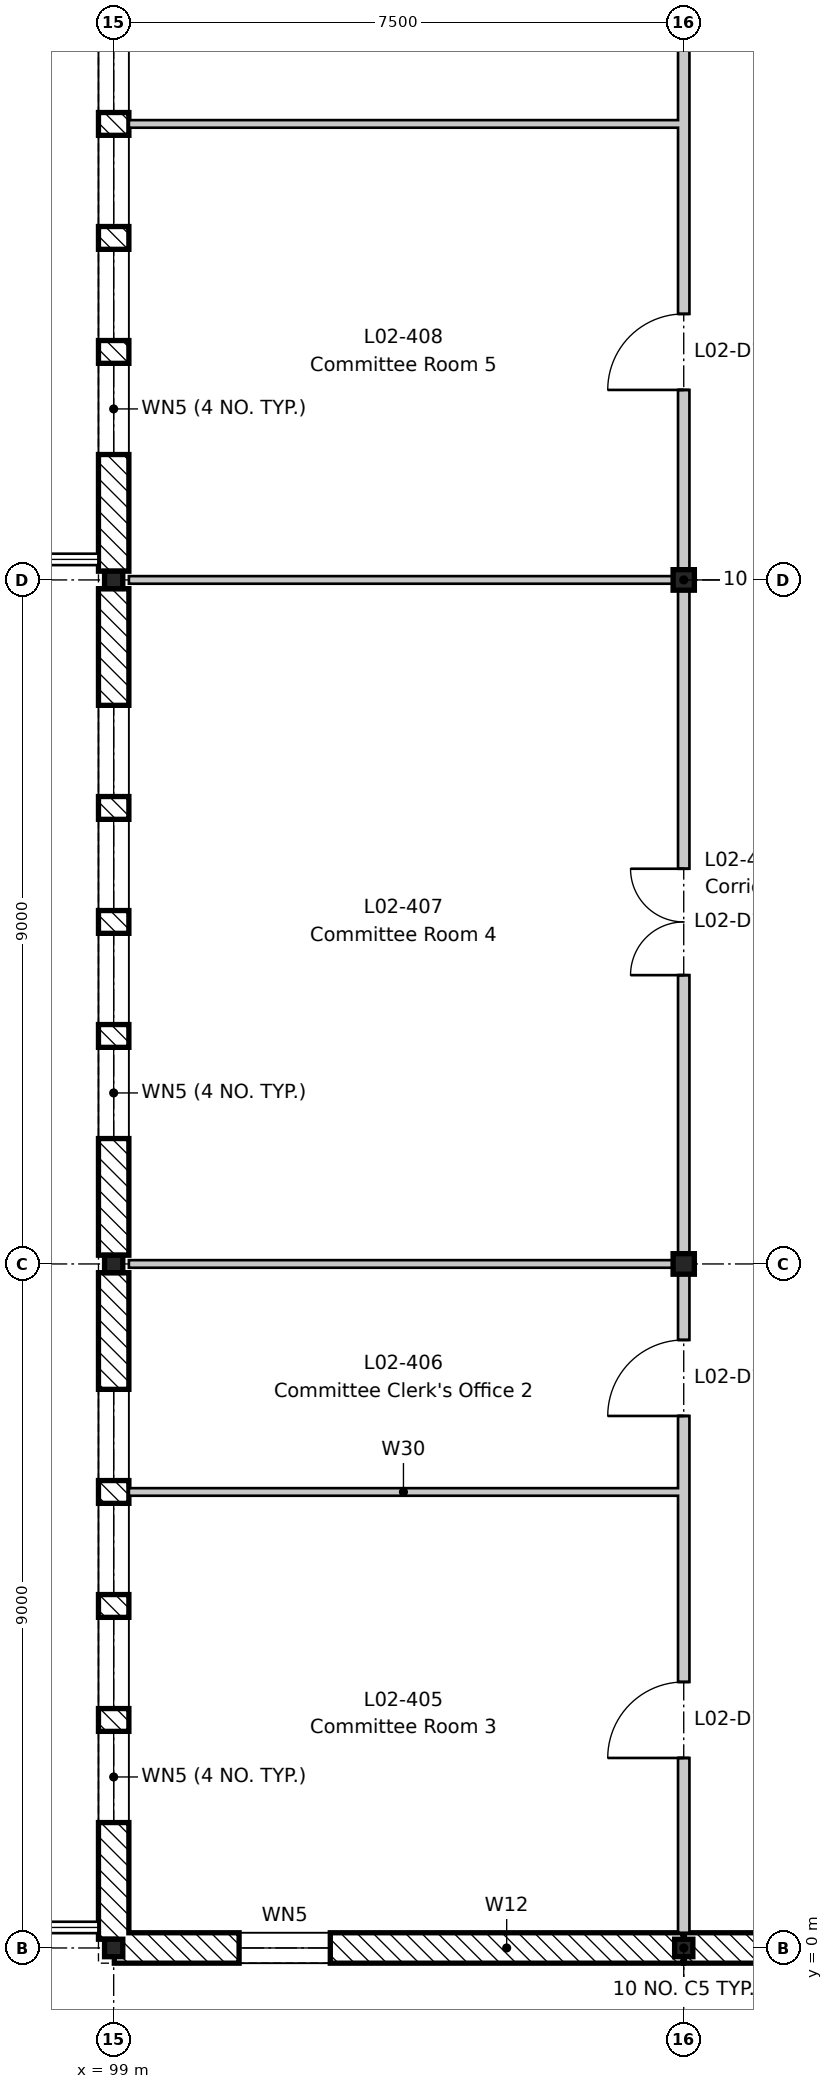
"""IFC4 building model, lengths in metres.
Left out: names, types, materials, properties, quantities, classifications, styles, units other than length and angle.
Written with IfcOpenShell. Run it as: python <this file> out.ifc"""

import sys

from ifc_helpers import new_model, si_unit, direction, frame, frame_2d, origin, origin_2d, place, context, subcontext, project, spatial, rectangle, i_section, extrude, element, fill, save


model = new_model("IFC4")
c1 = context("Model", 3, precision=1e-05, world=origin(), true_north=direction((0.0, 1.0)))
c2 = subcontext(c1, "Body", "Model", "MODEL_VIEW")
j1 = project(units=[si_unit("LENGTHUNIT", "METRE"), si_unit("PLANEANGLEUNIT", "RADIAN")], contexts=[c1])
p1 = place(None, origin())
s1 = spatial("IfcSite", under=j1, at=p1, CompositionType="ELEMENT")
p2 = place(p1, origin())
s2 = spatial("IfcBuilding", under=s1, at=p2, CompositionType="ELEMENT")
p3 = place(p2, frame((0.0, 0.0, 9.9)))
s3 = spatial("IfcBuildingStorey", under=s2, at=p3, CompositionType="ELEMENT", Elevation=9.9)
for number, where, z_axis, x_axis in (
    (1, (99.0, 0.0, -0.2), (0.0, 0.0, 1.0), (1.0, 0.0, 0.0)),
    (2, (99.0, 9.0, -0.2), (0.0, 0.0, 1.0), (1.0, 0.0, 0.0)),
    (3, (99.0, 18.0, -0.2), (0.0, 0.0, 1.0), (1.0, 0.0, 0.0)),
    (4, (106.5, 0.0, -0.2), (0.0, 0.0, 1.0), (1.0, 0.0, 0.0)),
):
    element("IfcColumn", number, at=place(p3, frame(where, z_axis=z_axis, x_axis=x_axis)), inside=s3, PredefinedType="COLUMN", context=c2, shape_type="SweptSolid", body=[
        extrude(i_section(OverallWidth=0.24, OverallDepth=0.23, WebThickness=0.008, FlangeThickness=0.012, FilletRadius=0.021, at=origin_2d()), origin(), (0.0, 0.0, 1.0), 4.5),
    ])
for number, where, z_axis, x_axis in (
    (5, (106.5, 9.0, -0.2), (0.0, 0.0, 1.0), (1.0, 0.0, 0.0)),
    (6, (106.5, 18.0, -0.2), (0.0, 0.0, 1.0), (1.0, 0.0, 0.0)),
):
    element("IfcColumn", number, at=place(p3, frame(where, z_axis=z_axis, x_axis=x_axis)), inside=s3, PredefinedType="COLUMN", context=c2, shape_type="SweptSolid", body=[
        extrude(i_section(OverallWidth=0.28, OverallDepth=0.27, WebThickness=0.008, FlangeThickness=0.013, FilletRadius=0.024, at=origin_2d()), origin(), (0.0, 0.0, 1.0), 4.5),
    ])
p4 = place(p3, frame((99.0, 0.115, 0.0), z_axis=(0.0, 0.0, 1.0), x_axis=(0.0, 1.0, 0.0)))
e7 = element("IfcWall", 7, at=p4, inside=s3, PredefinedType="STANDARD", context=c2, shape_type="SweptSolid", body=[
    extrude(rectangle(XDim=8.77, YDim=0.4, at=frame_2d((4.385, 0.0))), origin(), (0.0, 0.0, 1.0), 3.9),
])
p5 = place(p4, frame((1.535, 0.0, 0.6)))
e8 = element("IfcOpeningElement", 8, at=p5, cuts=e7, PredefinedType="OPENING", context=c2, shape_type="SweptSolid", body=[
    extrude(rectangle(XDim=1.2, YDim=3.0, at=frame_2d((0.6, 1.5))), frame((0.0, 0.21, 0.0), z_axis=(0.0, -1.0, 0.0), x_axis=(1.0, 0.0, 0.0)), (0.0, 0.0, 1.0), 0.42),
])
p6 = place(p4, frame((3.035, 0.0, 0.6)))
e9 = element("IfcOpeningElement", 9, at=p6, cuts=e7, PredefinedType="OPENING", context=c2, shape_type="SweptSolid", body=[
    extrude(rectangle(XDim=1.2, YDim=3.0, at=frame_2d((0.6, 1.5))), frame((0.0, 0.21, 0.0), z_axis=(0.0, -1.0, 0.0), x_axis=(1.0, 0.0, 0.0)), (0.0, 0.0, 1.0), 0.42),
])
p7 = place(p4, frame((4.535, 0.0, 0.6)))
e10 = element("IfcOpeningElement", 10, at=p7, cuts=e7, PredefinedType="OPENING", context=c2, shape_type="SweptSolid", body=[
    extrude(rectangle(XDim=1.2, YDim=3.0, at=frame_2d((0.6, 1.5))), frame((0.0, 0.21, 0.0), z_axis=(0.0, -1.0, 0.0), x_axis=(1.0, 0.0, 0.0)), (0.0, 0.0, 1.0), 0.42),
])
p8 = place(p4, frame((6.035, 0.0, 0.6)))
e11 = element("IfcOpeningElement", 11, at=p8, cuts=e7, PredefinedType="OPENING", context=c2, shape_type="SweptSolid", body=[
    extrude(rectangle(XDim=1.2, YDim=3.0, at=frame_2d((0.6, 1.5))), frame((0.0, 0.21, 0.0), z_axis=(0.0, -1.0, 0.0), x_axis=(1.0, 0.0, 0.0)), (0.0, 0.0, 1.0), 0.42),
])
p9 = place(p3, frame((99.0, 9.115, 0.0), z_axis=(0.0, 0.0, 1.0), x_axis=(0.0, 1.0, 0.0)))
e12 = element("IfcWall", 12, at=p9, inside=s3, PredefinedType="STANDARD", context=c2, shape_type="SweptSolid", body=[
    extrude(rectangle(XDim=8.77, YDim=0.4, at=frame_2d((4.385, 0.0))), origin(), (0.0, 0.0, 1.0), 3.9),
])
p10 = place(p9, frame((1.535, 0.0, 0.6)))
e13 = element("IfcOpeningElement", 13, at=p10, cuts=e12, PredefinedType="OPENING", context=c2, shape_type="SweptSolid", body=[
    extrude(rectangle(XDim=1.2, YDim=3.0, at=frame_2d((0.6, 1.5))), frame((0.0, 0.21, 0.0), z_axis=(0.0, -1.0, 0.0), x_axis=(1.0, 0.0, 0.0)), (0.0, 0.0, 1.0), 0.42),
])
p11 = place(p9, frame((3.035, 0.0, 0.6)))
e14 = element("IfcOpeningElement", 14, at=p11, cuts=e12, PredefinedType="OPENING", context=c2, shape_type="SweptSolid", body=[
    extrude(rectangle(XDim=1.2, YDim=3.0, at=frame_2d((0.6, 1.5))), frame((0.0, 0.21, 0.0), z_axis=(0.0, -1.0, 0.0), x_axis=(1.0, 0.0, 0.0)), (0.0, 0.0, 1.0), 0.42),
])
p12 = place(p9, frame((4.535, 0.0, 0.6)))
e15 = element("IfcOpeningElement", 15, at=p12, cuts=e12, PredefinedType="OPENING", context=c2, shape_type="SweptSolid", body=[
    extrude(rectangle(XDim=1.2, YDim=3.0, at=frame_2d((0.6, 1.5))), frame((0.0, 0.21, 0.0), z_axis=(0.0, -1.0, 0.0), x_axis=(1.0, 0.0, 0.0)), (0.0, 0.0, 1.0), 0.42),
])
p13 = place(p9, frame((6.035, 0.0, 0.6)))
e16 = element("IfcOpeningElement", 16, at=p13, cuts=e12, PredefinedType="OPENING", context=c2, shape_type="SweptSolid", body=[
    extrude(rectangle(XDim=1.2, YDim=3.0, at=frame_2d((0.6, 1.5))), frame((0.0, 0.21, 0.0), z_axis=(0.0, -1.0, 0.0), x_axis=(1.0, 0.0, 0.0)), (0.0, 0.0, 1.0), 0.42),
])
p14 = place(p3, frame((99.0, 18.115, 0.0), z_axis=(0.0, 0.0, 1.0), x_axis=(0.0, 1.0, 0.0)))
e17 = element("IfcWall", 17, at=p14, inside=s3, PredefinedType="STANDARD", context=c2, shape_type="SweptSolid", body=[
    extrude(rectangle(XDim=8.77, YDim=0.4, at=frame_2d((4.385, 0.0))), origin(), (0.0, 0.0, 1.0), 3.9),
])
p15 = place(p14, frame((1.535, 0.0, 0.6)))
e18 = element("IfcOpeningElement", 18, at=p15, cuts=e17, PredefinedType="OPENING", context=c2, shape_type="SweptSolid", body=[
    extrude(rectangle(XDim=1.2, YDim=3.0, at=frame_2d((0.6, 1.5))), frame((0.0, 0.21, 0.0), z_axis=(0.0, -1.0, 0.0), x_axis=(1.0, 0.0, 0.0)), (0.0, 0.0, 1.0), 0.42),
])
p16 = place(p14, frame((3.035, 0.0, 0.6)))
e19 = element("IfcOpeningElement", 19, at=p16, cuts=e17, PredefinedType="OPENING", context=c2, shape_type="SweptSolid", body=[
    extrude(rectangle(XDim=1.2, YDim=3.0, at=frame_2d((0.6, 1.5))), frame((0.0, 0.21, 0.0), z_axis=(0.0, -1.0, 0.0), x_axis=(1.0, 0.0, 0.0)), (0.0, 0.0, 1.0), 0.42),
])
p17 = place(p14, frame((4.535, 0.0, 0.6)))
e20 = element("IfcOpeningElement", 20, at=p17, cuts=e17, PredefinedType="OPENING", context=c2, shape_type="SweptSolid", body=[
    extrude(rectangle(XDim=1.2, YDim=3.0, at=frame_2d((0.6, 1.5))), frame((0.0, 0.21, 0.0), z_axis=(0.0, -1.0, 0.0), x_axis=(1.0, 0.0, 0.0)), (0.0, 0.0, 1.0), 0.42),
])
p18 = place(p14, frame((6.035, 0.0, 0.6)))
e21 = element("IfcOpeningElement", 21, at=p18, cuts=e17, PredefinedType="OPENING", context=c2, shape_type="SweptSolid", body=[
    extrude(rectangle(XDim=1.2, YDim=3.0, at=frame_2d((0.6, 1.5))), frame((0.0, 0.21, 0.0), z_axis=(0.0, -1.0, 0.0), x_axis=(1.0, 0.0, 0.0)), (0.0, 0.0, 1.0), 0.42),
])
p19 = place(p3, frame((106.491, 0.0, 0.0), z_axis=(0.0, 0.0, 1.0), x_axis=(-1.0, 0.0, 0.0)))
e22 = element("IfcWall", 22, at=p19, inside=s3, PredefinedType="STANDARD", context=c2, shape_type="SweptSolid", body=[
    extrude(rectangle(XDim=7.482, YDim=0.4, at=frame_2d((3.741, 0.0))), origin(), (0.0, 0.0, 1.0), 3.97),
])
p20 = place(p19, frame((4.641, 0.0, 0.6)))
e23 = element("IfcOpeningElement", 23, at=p20, cuts=e22, PredefinedType="OPENING", context=c2, shape_type="SweptSolid", body=[
    extrude(rectangle(XDim=1.2, YDim=3.0, at=frame_2d((0.6, 1.5))), frame((0.0, 0.21, 0.0), z_axis=(0.0, -1.0, 0.0), x_axis=(1.0, 0.0, 0.0)), (0.0, 0.0, 1.0), 0.42),
])
p21 = place(p3, frame((109.491, 0.0, 0.0), z_axis=(0.0, 0.0, 1.0), x_axis=(-1.0, 0.0, 0.0)))
e24 = element("IfcWall", 24, at=p21, inside=s3, PredefinedType="STANDARD", context=c2, shape_type="SweptSolid", body=[
    extrude(rectangle(XDim=2.982, YDim=0.4, at=frame_2d((1.491, 0.0))), origin(), (0.0, 0.0, 1.0), 4.1),
])
p22 = place(p3, frame((99.2, 6.0, 0.0), z_axis=(0.0, 0.0, 1.0), x_axis=(1.0, 0.0, 0.0)))
e25 = element("IfcWall", 25, at=p22, inside=s3, PredefinedType="PARTITIONING", context=c2, shape_type="SweptSolid", body=[
    extrude(rectangle(XDim=7.225, YDim=0.1, at=frame_2d((3.613, 0.0))), origin(), (0.0, 0.0, 1.0), 4.3),
])
for number, where, z_axis, x_axis in (
    (26, (99.2, 9.0, 0.0), (0.0, 0.0, 1.0), (1.0, 0.0, 0.0)),
    (27, (99.2, 18.0, 0.0), (0.0, 0.0, 1.0), (1.0, 0.0, 0.0)),
):
    element("IfcWall", number, at=place(p3, frame(where, z_axis=z_axis, x_axis=x_axis)), inside=s3, PredefinedType="PARTITIONING", context=c2, shape_type="SweptSolid", body=[
        extrude(rectangle(XDim=7.225, YDim=0.1, at=frame_2d((3.613, 0.0))), origin(), (0.0, 0.0, 1.0), 3.95),
    ])
p23 = place(p3, frame((99.2, 24.0, 0.0), z_axis=(0.0, 0.0, 1.0), x_axis=(1.0, 0.0, 0.0)))
e28 = element("IfcWall", 28, at=p23, inside=s3, PredefinedType="PARTITIONING", context=c2, shape_type="SweptSolid", body=[
    extrude(rectangle(XDim=7.225, YDim=0.1, at=frame_2d((3.613, 0.0))), origin(), (0.0, 0.0, 1.0), 4.3),
])
p24 = place(p3, frame((106.5, 0.2, 0.0), z_axis=(0.0, 0.0, 1.0), x_axis=(0.0, 1.0, 0.0)))
e29 = element("IfcWall", 29, at=p24, inside=s3, PredefinedType="PARTITIONING", context=c2, shape_type="SweptSolid", body=[
    extrude(rectangle(XDim=53.6, YDim=0.15, at=frame_2d((26.8, 0.0))), origin(), (0.0, 0.0, 1.0), 3.78),
])
p25 = place(p24, frame((2.3, 0.0, 0.0)))
e30 = element("IfcOpeningElement", 30, at=p25, cuts=e29, PredefinedType="OPENING", context=c2, shape_type="SweptSolid", body=[
    extrude(rectangle(XDim=1.0, YDim=2.1, at=frame_2d((0.5, 1.05))), frame((0.0, 0.085, 0.0), z_axis=(0.0, -1.0, 0.0), x_axis=(1.0, 0.0, 0.0)), (0.0, 0.0, 1.0), 0.17),
])
p26 = place(p24, frame((6.8, 0.0, 0.0)))
e31 = element("IfcOpeningElement", 31, at=p26, cuts=e29, PredefinedType="OPENING", context=c2, shape_type="SweptSolid", body=[
    extrude(rectangle(XDim=1.0, YDim=2.1, at=frame_2d((0.5, 1.05))), frame((0.0, 0.085, 0.0), z_axis=(0.0, -1.0, 0.0), x_axis=(1.0, 0.0, 0.0)), (0.0, 0.0, 1.0), 0.17),
])
p27 = place(p24, frame((12.6, 0.0, 0.0)))
e32 = element("IfcOpeningElement", 32, at=p27, cuts=e29, PredefinedType="OPENING", context=c2, shape_type="SweptSolid", body=[
    extrude(rectangle(XDim=1.4, YDim=2.1, at=frame_2d((0.7, 1.05))), frame((0.0, 0.085, 0.0), z_axis=(0.0, -1.0, 0.0), x_axis=(1.0, 0.0, 0.0)), (0.0, 0.0, 1.0), 0.17),
])
p28 = place(p24, frame((20.3, 0.0, 0.0)))
e33 = element("IfcOpeningElement", 33, at=p28, cuts=e29, PredefinedType="OPENING", context=c2, shape_type="SweptSolid", body=[
    extrude(rectangle(XDim=1.0, YDim=2.1, at=frame_2d((0.5, 1.05))), frame((0.0, 0.085, 0.0), z_axis=(0.0, -1.0, 0.0), x_axis=(1.0, 0.0, 0.0)), (0.0, 0.0, 1.0), 0.17),
])
p29 = place(p24, frame((27.6, 0.0, 0.0)))
e34 = element("IfcOpeningElement", 34, at=p29, cuts=e29, PredefinedType="OPENING", context=c2, shape_type="SweptSolid", body=[
    extrude(rectangle(XDim=1.4, YDim=2.1, at=frame_2d((0.7, 1.05))), frame((0.0, 0.085, 0.0), z_axis=(0.0, -1.0, 0.0), x_axis=(1.0, 0.0, 0.0)), (0.0, 0.0, 1.0), 0.17),
])
p30 = place(p24, frame((36.55, 0.0, 0.0)))
e35 = element("IfcOpeningElement", 35, at=p30, cuts=e29, PredefinedType="OPENING", context=c2, shape_type="SweptSolid", body=[
    extrude(rectangle(XDim=1.0, YDim=2.1, at=frame_2d((0.5, 1.05))), frame((0.0, 0.085, 0.0), z_axis=(0.0, -1.0, 0.0), x_axis=(1.0, 0.0, 0.0)), (0.0, 0.0, 1.0), 0.17),
])
p31 = place(p24, frame((39.8, 0.0, 0.0)))
e36 = element("IfcOpeningElement", 36, at=p31, cuts=e29, PredefinedType="OPENING", context=c2, shape_type="SweptSolid", body=[
    extrude(rectangle(XDim=1.0, YDim=2.1, at=frame_2d((0.5, 1.05))), frame((0.0, 0.085, 0.0), z_axis=(0.0, -1.0, 0.0), x_axis=(1.0, 0.0, 0.0)), (0.0, 0.0, 1.0), 0.17),
])
p32 = place(p24, frame((45.6, 0.0, 0.0)))
e37 = element("IfcOpeningElement", 37, at=p32, cuts=e29, PredefinedType="OPENING", context=c2, shape_type="SweptSolid", body=[
    extrude(rectangle(XDim=1.4, YDim=2.1, at=frame_2d((0.7, 1.05))), frame((0.0, 0.085, 0.0), z_axis=(0.0, -1.0, 0.0), x_axis=(1.0, 0.0, 0.0)), (0.0, 0.0, 1.0), 0.17),
])
p33 = place(p24, frame((51.8, 0.0, 0.0)))
e38 = element("IfcOpeningElement", 38, at=p33, cuts=e29, PredefinedType="OPENING", context=c2, shape_type="SweptSolid", body=[
    extrude(rectangle(XDim=1.0, YDim=2.1, at=frame_2d((0.5, 1.05))), frame((0.0, 0.085, 0.0), z_axis=(0.0, -1.0, 0.0), x_axis=(1.0, 0.0, 0.0)), (0.0, 0.0, 1.0), 0.17),
])
p34 = place(p5, origin())
e39 = element("IfcWindow", 39, at=p34, inside=s3, PartitioningType="SINGLE_PANEL", PredefinedType="WINDOW", context=c2, shape_type="SweptSolid", body=[
    extrude(rectangle(XDim=1.2, YDim=3.0, at=frame_2d((0.6, 1.5))), frame((0.0, 0.03, 0.0), z_axis=(0.0, -1.0, 0.0), x_axis=(1.0, 0.0, 0.0)), (0.0, 0.0, 1.0), 0.06),
])
fill(e8, e39)
p35 = place(p6, origin())
e40 = element("IfcWindow", 40, at=p35, inside=s3, PartitioningType="SINGLE_PANEL", PredefinedType="WINDOW", context=c2, shape_type="SweptSolid", body=[
    extrude(rectangle(XDim=1.2, YDim=3.0, at=frame_2d((0.6, 1.5))), frame((0.0, 0.03, 0.0), z_axis=(0.0, -1.0, 0.0), x_axis=(1.0, 0.0, 0.0)), (0.0, 0.0, 1.0), 0.06),
])
fill(e9, e40)
p36 = place(p7, origin())
e41 = element("IfcWindow", 41, at=p36, inside=s3, PartitioningType="SINGLE_PANEL", PredefinedType="WINDOW", context=c2, shape_type="SweptSolid", body=[
    extrude(rectangle(XDim=1.2, YDim=3.0, at=frame_2d((0.6, 1.5))), frame((0.0, 0.03, 0.0), z_axis=(0.0, -1.0, 0.0), x_axis=(1.0, 0.0, 0.0)), (0.0, 0.0, 1.0), 0.06),
])
fill(e10, e41)
p37 = place(p8, origin())
e42 = element("IfcWindow", 42, at=p37, inside=s3, PartitioningType="SINGLE_PANEL", PredefinedType="WINDOW", context=c2, shape_type="SweptSolid", body=[
    extrude(rectangle(XDim=1.2, YDim=3.0, at=frame_2d((0.6, 1.5))), frame((0.0, 0.03, 0.0), z_axis=(0.0, -1.0, 0.0), x_axis=(1.0, 0.0, 0.0)), (0.0, 0.0, 1.0), 0.06),
])
fill(e11, e42)
p38 = place(p10, origin())
e43 = element("IfcWindow", 43, at=p38, inside=s3, PartitioningType="SINGLE_PANEL", PredefinedType="WINDOW", context=c2, shape_type="SweptSolid", body=[
    extrude(rectangle(XDim=1.2, YDim=3.0, at=frame_2d((0.6, 1.5))), frame((0.0, 0.03, 0.0), z_axis=(0.0, -1.0, 0.0), x_axis=(1.0, 0.0, 0.0)), (0.0, 0.0, 1.0), 0.06),
])
fill(e13, e43)
p39 = place(p11, origin())
e44 = element("IfcWindow", 44, at=p39, inside=s3, PartitioningType="SINGLE_PANEL", PredefinedType="WINDOW", context=c2, shape_type="SweptSolid", body=[
    extrude(rectangle(XDim=1.2, YDim=3.0, at=frame_2d((0.6, 1.5))), frame((0.0, 0.03, 0.0), z_axis=(0.0, -1.0, 0.0), x_axis=(1.0, 0.0, 0.0)), (0.0, 0.0, 1.0), 0.06),
])
fill(e14, e44)
p40 = place(p12, origin())
e45 = element("IfcWindow", 45, at=p40, inside=s3, PartitioningType="SINGLE_PANEL", PredefinedType="WINDOW", context=c2, shape_type="SweptSolid", body=[
    extrude(rectangle(XDim=1.2, YDim=3.0, at=frame_2d((0.6, 1.5))), frame((0.0, 0.03, 0.0), z_axis=(0.0, -1.0, 0.0), x_axis=(1.0, 0.0, 0.0)), (0.0, 0.0, 1.0), 0.06),
])
fill(e15, e45)
p41 = place(p13, origin())
e46 = element("IfcWindow", 46, at=p41, inside=s3, PartitioningType="SINGLE_PANEL", PredefinedType="WINDOW", context=c2, shape_type="SweptSolid", body=[
    extrude(rectangle(XDim=1.2, YDim=3.0, at=frame_2d((0.6, 1.5))), frame((0.0, 0.03, 0.0), z_axis=(0.0, -1.0, 0.0), x_axis=(1.0, 0.0, 0.0)), (0.0, 0.0, 1.0), 0.06),
])
fill(e16, e46)
p42 = place(p15, origin())
e47 = element("IfcWindow", 47, at=p42, inside=s3, PartitioningType="SINGLE_PANEL", PredefinedType="WINDOW", context=c2, shape_type="SweptSolid", body=[
    extrude(rectangle(XDim=1.2, YDim=3.0, at=frame_2d((0.6, 1.5))), frame((0.0, 0.03, 0.0), z_axis=(0.0, -1.0, 0.0), x_axis=(1.0, 0.0, 0.0)), (0.0, 0.0, 1.0), 0.06),
])
fill(e18, e47)
p43 = place(p16, origin())
e48 = element("IfcWindow", 48, at=p43, inside=s3, PartitioningType="SINGLE_PANEL", PredefinedType="WINDOW", context=c2, shape_type="SweptSolid", body=[
    extrude(rectangle(XDim=1.2, YDim=3.0, at=frame_2d((0.6, 1.5))), frame((0.0, 0.03, 0.0), z_axis=(0.0, -1.0, 0.0), x_axis=(1.0, 0.0, 0.0)), (0.0, 0.0, 1.0), 0.06),
])
fill(e19, e48)
p44 = place(p17, origin())
e49 = element("IfcWindow", 49, at=p44, inside=s3, PartitioningType="SINGLE_PANEL", PredefinedType="WINDOW", context=c2, shape_type="SweptSolid", body=[
    extrude(rectangle(XDim=1.2, YDim=3.0, at=frame_2d((0.6, 1.5))), frame((0.0, 0.03, 0.0), z_axis=(0.0, -1.0, 0.0), x_axis=(1.0, 0.0, 0.0)), (0.0, 0.0, 1.0), 0.06),
])
fill(e20, e49)
p45 = place(p18, origin())
e50 = element("IfcWindow", 50, at=p45, inside=s3, PartitioningType="SINGLE_PANEL", PredefinedType="WINDOW", context=c2, shape_type="SweptSolid", body=[
    extrude(rectangle(XDim=1.2, YDim=3.0, at=frame_2d((0.6, 1.5))), frame((0.0, 0.03, 0.0), z_axis=(0.0, -1.0, 0.0), x_axis=(1.0, 0.0, 0.0)), (0.0, 0.0, 1.0), 0.06),
])
fill(e21, e50)
p46 = place(p20, origin())
e51 = element("IfcWindow", 51, at=p46, inside=s3, PartitioningType="SINGLE_PANEL", PredefinedType="WINDOW", context=c2, shape_type="SweptSolid", body=[
    extrude(rectangle(XDim=1.2, YDim=3.0, at=frame_2d((0.6, 1.5))), frame((0.0, 0.03, 0.0), z_axis=(0.0, -1.0, 0.0), x_axis=(1.0, 0.0, 0.0)), (0.0, 0.0, 1.0), 0.06),
])
fill(e23, e51)
p47 = place(p25, origin())
e52 = element("IfcDoor", 52, at=p47, inside=s3, OperationType="SINGLE_SWING_LEFT", PredefinedType="DOOR", context=c2, shape_type="SweptSolid", body=[
    extrude(rectangle(XDim=1.0, YDim=2.1, at=frame_2d((0.5, 1.05))), frame((0.0, 0.025, 0.0), z_axis=(0.0, -1.0, 0.0), x_axis=(1.0, 0.0, 0.0)), (0.0, 0.0, 1.0), 0.05),
])
fill(e30, e52)
p48 = place(p26, origin())
e53 = element("IfcDoor", 53, at=p48, inside=s3, OperationType="SINGLE_SWING_LEFT", PredefinedType="DOOR", context=c2, shape_type="SweptSolid", body=[
    extrude(rectangle(XDim=1.0, YDim=2.1, at=frame_2d((0.5, 1.05))), frame((0.0, 0.025, 0.0), z_axis=(0.0, -1.0, 0.0), x_axis=(1.0, 0.0, 0.0)), (0.0, 0.0, 1.0), 0.05),
])
fill(e31, e53)
p49 = place(p27, origin())
e54 = element("IfcDoor", 54, at=p49, inside=s3, OperationType="DOUBLE_DOOR_SINGLE_SWING", PredefinedType="DOOR", context=c2, shape_type="SweptSolid", body=[
    extrude(rectangle(XDim=1.4, YDim=2.1, at=frame_2d((0.7, 1.05))), frame((0.0, 0.025, 0.0), z_axis=(0.0, -1.0, 0.0), x_axis=(1.0, 0.0, 0.0)), (0.0, 0.0, 1.0), 0.05),
])
fill(e32, e54)
p50 = place(p28, origin())
e55 = element("IfcDoor", 55, at=p50, inside=s3, OperationType="SINGLE_SWING_LEFT", PredefinedType="DOOR", context=c2, shape_type="SweptSolid", body=[
    extrude(rectangle(XDim=1.0, YDim=2.1, at=frame_2d((0.5, 1.05))), frame((0.0, 0.025, 0.0), z_axis=(0.0, -1.0, 0.0), x_axis=(1.0, 0.0, 0.0)), (0.0, 0.0, 1.0), 0.05),
])
fill(e33, e55)
save(model, sys.argv[1])
